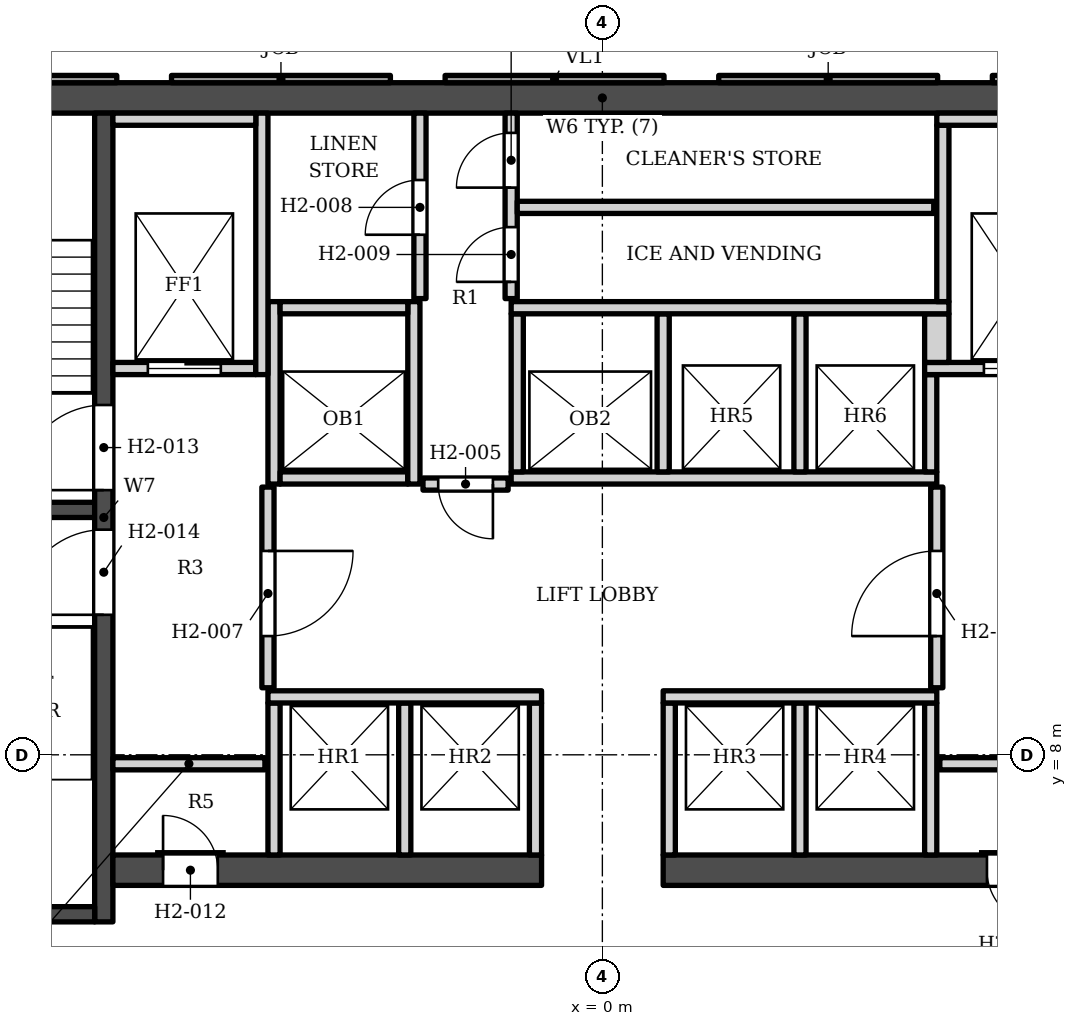
"""IFC4 building model, lengths in metres.
Left out: names, types, materials, properties, quantities, classifications, styles, units other than length and angle.
Written with IfcOpenShell. Run it as: python <this file> out.ifc"""

import sys

from ifc_helpers import new_model, si_unit, direction, frame, frame_2d, origin, place, context, subcontext, project, spatial, polyline, rectangle, outline, extrude, element, fill, save


model = new_model("IFC4")
c1 = context("Model", 3, precision=1e-05, world=origin(), true_north=direction((0.0, 1.0)))
c2 = subcontext(c1, "Body", "Model", "MODEL_VIEW")
j1 = project(units=[si_unit("LENGTHUNIT", "METRE"), si_unit("PLANEANGLEUNIT", "RADIAN")], contexts=[c1])
p1 = place(None, origin())
s1 = spatial("IfcSite", under=j1, at=p1, CompositionType="ELEMENT")
p2 = place(p1, origin())
s2 = spatial("IfcBuilding", under=s1, at=p2, CompositionType="ELEMENT")
p3 = place(p2, frame((0.0, 0.0, 56.2)))
s3 = spatial("IfcBuildingStorey", under=s2, at=p3, CompositionType="ELEMENT", Elevation=56.2)
p4 = place(p3, frame((-16.9, 18.802, 0.0), z_axis=(0.0, 0.0, 1.0), x_axis=(1.0, 0.0, 0.0)))
e1 = element("IfcWall", 1, at=p4, inside=s3, PredefinedType="SHEAR", context=c2, shape_type="SweptSolid", body=[
    extrude(rectangle(XDim=33.8, YDim=0.5, at=frame_2d((16.9, 0.0))), origin(), (0.0, 0.0, 1.0), 3.4),
])
p5 = place(p3, frame((-8.2, 5.253, 0.0), z_axis=(0.0, 0.0, 1.0), x_axis=(0.0, 1.0, 0.0)))
e2 = element("IfcWall", 2, at=p5, inside=s3, PredefinedType="SHEAR", context=c2, shape_type="SweptSolid", body=[
    extrude(rectangle(XDim=13.3, YDim=0.3, at=frame_2d((6.65, 0.0))), origin(), (0.0, 0.0, 1.0), 3.4),
])
p6 = place(p5, frame((7.1, 0.0, 0.0)))
e3 = element("IfcOpeningElement", 3, at=p6, cuts=e2, PredefinedType="OPENING", context=c2, shape_type="SweptSolid", body=[
    extrude(rectangle(XDim=1.4, YDim=2.1, at=frame_2d((0.7, 1.05))), frame((0.0, 0.16, 0.0), z_axis=(0.0, -1.0, 0.0), x_axis=(1.0, 0.0, 0.0)), (0.0, 0.0, 1.0), 0.32),
])
p7 = place(p5, frame((5.05, 0.0, 0.0)))
e4 = element("IfcOpeningElement", 4, at=p7, cuts=e2, PredefinedType="OPENING", context=c2, shape_type="SweptSolid", body=[
    extrude(rectangle(XDim=1.4, YDim=2.1, at=frame_2d((0.7, 1.05))), frame((0.0, 0.16, 0.0), z_axis=(0.0, -1.0, 0.0), x_axis=(1.0, 0.0, 0.0)), (0.0, 0.0, 1.0), 0.32),
])
for number, where, z_axis, x_axis in (
    (5, (-12.1, 12.028, 0.0), (0.0, 0.0, 1.0), (1.0, 0.0, 0.0)),
    (6, (-12.1, 5.378, 0.0), (0.0, 0.0, 1.0), (1.0, 0.0, 0.0)),
):
    element("IfcWall", number, at=place(p3, frame(where, z_axis=z_axis, x_axis=x_axis)), inside=s3, PredefinedType="SHEAR", context=c2, shape_type="SweptSolid", body=[
        extrude(rectangle(XDim=3.75, YDim=0.25, at=frame_2d((1.875, 0.0))), origin(), (0.0, 0.0, 1.0), 3.4),
    ])
p8 = place(p3, frame((-8.05, 6.103, 0.0), z_axis=(0.0, 0.0, 1.0), x_axis=(1.0, 0.0, 0.0)))
e7 = element("IfcWall", 7, at=p8, inside=s3, PredefinedType="SHEAR", context=c2, shape_type="SweptSolid", body=[
    extrude(rectangle(XDim=7.05, YDim=0.5, at=frame_2d((3.525, 0.0))), origin(), (0.0, 0.0, 1.0), 3.4),
])
p9 = place(p8, frame((0.825, 0.0, 0.0)))
e8 = element("IfcOpeningElement", 8, at=p9, cuts=e7, PredefinedType="OPENING", context=c2, shape_type="SweptSolid", body=[
    extrude(rectangle(XDim=0.9, YDim=2.1, at=frame_2d((0.45, 1.05))), frame((0.0, 0.26, 0.0), z_axis=(0.0, -1.0, 0.0), x_axis=(1.0, 0.0, 0.0)), (0.0, 0.0, 1.0), 0.52),
])
p10 = place(p3, frame((1.0, 6.103, 0.0), z_axis=(0.0, 0.0, 1.0), x_axis=(1.0, 0.0, 0.0)))
e9 = element("IfcWall", 9, at=p10, inside=s3, PredefinedType="SHEAR", context=c2, shape_type="SweptSolid", body=[
    extrude(rectangle(XDim=7.05, YDim=0.5, at=frame_2d((3.525, 0.0))), origin(), (0.0, 0.0, 1.0), 3.4),
])
p11 = place(p10, frame((5.325, 0.0, 0.0)))
e10 = element("IfcOpeningElement", 10, at=p11, cuts=e9, PredefinedType="OPENING", context=c2, shape_type="SweptSolid", body=[
    extrude(rectangle(XDim=0.9, YDim=2.1, at=frame_2d((0.45, 1.05))), frame((0.0, 0.26, 0.0), z_axis=(0.0, -1.0, 0.0), x_axis=(1.0, 0.0, 0.0)), (0.0, 0.0, 1.0), 0.52),
])
p12 = place(p3, origin())
e11 = element("IfcWall", 11, at=p12, inside=s3, PredefinedType="ELEMENTEDWALL", context=c2, shape_type="SweptSolid", body=[
    extrude(outline(polyline([(6.414, 19.173), (6.414, 19.052), (10.014, 19.052), (10.014, 19.173), (6.414, 19.173)])), origin(), (0.0, 0.0, 1.0), 2.65),
])
p13 = place(p3, origin())
e12 = element("IfcWall", 12, at=p13, inside=s3, PredefinedType="SOLIDWALL", context=c2, shape_type="SweptSolid", body=[
    extrude(outline(polyline([(1.914, 19.173), (1.914, 19.052), (5.514, 19.052), (5.514, 19.173), (1.914, 19.173)])), origin(), (0.0, 0.0, 1.0), 2.65),
])
p14 = place(p3, origin())
e13 = element("IfcWall", 13, at=p14, inside=s3, PredefinedType="ELEMENTEDWALL", context=c2, shape_type="SweptSolid", body=[
    extrude(outline(polyline([(-2.586, 19.173), (-2.586, 19.052), (1.014, 19.052), (1.014, 19.173), (-2.586, 19.173)])), origin(), (0.0, 0.0, 1.0), 2.65),
])
p15 = place(p3, origin())
e14 = element("IfcWall", 14, at=p15, inside=s3, PredefinedType="SOLIDWALL", context=c2, shape_type="SweptSolid", body=[
    extrude(outline(polyline([(-7.086, 19.173), (-7.086, 19.052), (-3.486, 19.052), (-3.486, 19.173), (-7.086, 19.173)])), origin(), (0.0, 0.0, 1.0), 2.65),
])
p16 = place(p3, origin())
e15 = element("IfcWall", 15, at=p16, inside=s3, PredefinedType="ELEMENTEDWALL", context=c2, shape_type="SweptSolid", body=[
    extrude(outline(polyline([(-11.586, 19.173), (-11.586, 19.052), (-7.986, 19.052), (-7.986, 19.173), (-11.586, 19.173)])), origin(), (0.0, 0.0, 1.0), 2.65),
])
for number, where, z_axis, x_axis in (
    (16, (-5.4, 6.353, 0.0), (0.0, 0.0, 1.0), (0.0, 1.0, 0.0)),
    (17, (-3.25, 6.353, 0.0), (0.0, 0.0, 1.0), (0.0, 1.0, 0.0)),
    (18, (-1.1, 6.353, 0.0), (0.0, 0.0, 1.0), (0.0, 1.0, 0.0)),
    (19, (1.1, 6.353, 0.0), (0.0, 0.0, 1.0), (0.0, 1.0, 0.0)),
    (20, (3.25, 6.353, 0.0), (0.0, 0.0, 1.0), (0.0, 1.0, 0.0)),
    (21, (5.4, 6.353, 0.0), (0.0, 0.0, 1.0), (0.0, 1.0, 0.0)),
    (22, (-8.05, 7.853, 0.0), (0.0, 0.0, 1.0), (1.0, 0.0, 0.0)),
    (23, (5.55, 7.853, 0.0), (0.0, 0.0, 1.0), (1.0, 0.0, 0.0)),
):
    element("IfcWall", number, at=place(p3, frame(where, z_axis=z_axis, x_axis=x_axis)), inside=s3, PredefinedType="SOLIDWALL", context=c2, shape_type="SweptSolid", body=[
        extrude(rectangle(XDim=2.5, YDim=0.2, at=frame_2d((1.25, 0.0))), origin(), (0.0, 0.0, 1.0), 3.23),
    ])
for number, where, z_axis, x_axis in (
    (24, (-5.5, 8.953, 0.0), (0.0, 0.0, 1.0), (1.0, 0.0, 0.0)),
    (25, (1.0, 8.953, 0.0), (0.0, 0.0, 1.0), (1.0, 0.0, 0.0)),
):
    element("IfcWall", number, at=place(p3, frame(where, z_axis=z_axis, x_axis=x_axis)), inside=s3, PredefinedType="SOLIDWALL", context=c2, shape_type="SweptSolid", body=[
        extrude(rectangle(XDim=4.5, YDim=0.2, at=frame_2d((2.25, 0.0))), origin(), (0.0, 0.0, 1.0), 3.23),
    ])
p17 = place(p3, frame((-5.5, 9.103, 0.0), z_axis=(0.0, 0.0, 1.0), x_axis=(0.0, 1.0, 0.0)))
e26 = element("IfcWall", 26, at=p17, inside=s3, PredefinedType="SOLIDWALL", context=c2, shape_type="SweptSolid", body=[
    extrude(rectangle(XDim=3.3, YDim=0.2, at=frame_2d((1.65, 0.0))), origin(), (0.0, 0.0, 1.0), 3.23),
])
p18 = place(p17, frame((0.85, 0.0, 0.0)))
e27 = element("IfcOpeningElement", 27, at=p18, cuts=e26, PredefinedType="OPENING", context=c2, shape_type="SweptSolid", body=[
    extrude(rectangle(XDim=1.4, YDim=2.1, at=frame_2d((0.7, 1.05))), frame((0.0, 0.11, 0.0), z_axis=(0.0, -1.0, 0.0), x_axis=(1.0, 0.0, 0.0)), (0.0, 0.0, 1.0), 0.22),
])
p19 = place(p3, frame((5.5, 9.103, 0.0), z_axis=(0.0, 0.0, 1.0), x_axis=(0.0, 1.0, 0.0)))
e28 = element("IfcWall", 28, at=p19, inside=s3, PredefinedType="SOLIDWALL", context=c2, shape_type="SweptSolid", body=[
    extrude(rectangle(XDim=3.3, YDim=0.2, at=frame_2d((1.65, 0.0))), origin(), (0.0, 0.0, 1.0), 3.23),
])
p20 = place(p19, frame((0.85, 0.0, 0.0)))
e29 = element("IfcOpeningElement", 29, at=p20, cuts=e28, PredefinedType="OPENING", context=c2, shape_type="SweptSolid", body=[
    extrude(rectangle(XDim=1.4, YDim=2.1, at=frame_2d((0.7, 1.05))), frame((0.0, 0.11, 0.0), z_axis=(0.0, -1.0, 0.0), x_axis=(1.0, 0.0, 0.0)), (0.0, 0.0, 1.0), 0.22),
])
p21 = place(p3, frame((-2.95, 12.453, 0.0), z_axis=(0.0, 0.0, 1.0), x_axis=(1.0, 0.0, 0.0)))
e30 = element("IfcWall", 30, at=p21, inside=s3, PredefinedType="SOLIDWALL", context=c2, shape_type="SweptSolid", body=[
    extrude(rectangle(XDim=1.4, YDim=0.2, at=frame_2d((0.7, 0.0))), origin(), (0.0, 0.0, 1.0), 3.23),
])
p22 = place(p21, frame((0.25, 0.0, 0.0)))
e31 = element("IfcOpeningElement", 31, at=p22, cuts=e30, PredefinedType="OPENING", context=c2, shape_type="SweptSolid", body=[
    extrude(rectangle(XDim=0.9, YDim=2.1, at=frame_2d((0.45, 1.05))), frame((0.0, 0.11, 0.0), z_axis=(0.0, -1.0, 0.0), x_axis=(1.0, 0.0, 0.0)), (0.0, 0.0, 1.0), 0.22),
])
p23 = place(p3, frame((-5.4, 12.453, 0.0), z_axis=(0.0, 0.0, 1.0), x_axis=(0.0, 1.0, 0.0)))
e32 = element("IfcWall", 32, at=p23, inside=s3, PredefinedType="SOLIDWALL", context=c2, shape_type="SweptSolid", body=[
    extrude(rectangle(XDim=3.0, YDim=0.2, at=frame_2d((1.5, 0.0))), origin(), (0.0, 0.0, 1.0), 3.23),
])
p24 = place(p3, frame((-5.3, 12.552, 0.0), z_axis=(0.0, 0.0, 1.0), x_axis=(1.0, 0.0, 0.0)))
e33 = element("IfcWall", 33, at=p24, inside=s3, PredefinedType="SOLIDWALL", context=c2, shape_type="SweptSolid", body=[
    extrude(rectangle(XDim=2.1, YDim=0.2, at=frame_2d((1.05, 0.0))), origin(), (0.0, 0.0, 1.0), 3.23),
])
p25 = place(p3, frame((-3.1, 12.453, 0.0), z_axis=(0.0, 0.0, 1.0), x_axis=(0.0, 1.0, 0.0)))
e34 = element("IfcWall", 34, at=p25, inside=s3, PredefinedType="SOLIDWALL", context=c2, shape_type="SweptSolid", body=[
    extrude(rectangle(XDim=3.0, YDim=0.2, at=frame_2d((1.5, 0.0))), origin(), (0.0, 0.0, 1.0), 3.23),
])
p26 = place(p3, frame((-1.5, 12.552, 0.0), z_axis=(0.0, 0.0, 1.0), x_axis=(1.0, 0.0, 0.0)))
e35 = element("IfcWall", 35, at=p26, inside=s3, PredefinedType="SOLIDWALL", context=c2, shape_type="SweptSolid", body=[
    extrude(rectangle(XDim=7.0, YDim=0.2, at=frame_2d((3.5, 0.0))), origin(), (0.0, 0.0, 1.0), 3.23),
])
for number, where, z_axis, x_axis in (
    (36, (-1.4, 12.653, 0.0), (0.0, 0.0, 1.0), (0.0, 1.0, 0.0)),
    (37, (1.0, 12.653, 0.0), (0.0, 0.0, 1.0), (0.0, 1.0, 0.0)),
    (38, (3.25, 12.653, 0.0), (0.0, 0.0, 1.0), (0.0, 1.0, 0.0)),
):
    element("IfcWall", number, at=place(p3, frame(where, z_axis=z_axis, x_axis=x_axis)), inside=s3, PredefinedType="SOLIDWALL", context=c2, shape_type="SweptSolid", body=[
        extrude(rectangle(XDim=2.6, YDim=0.2, at=frame_2d((1.3, 0.0))), origin(), (0.0, 0.0, 1.0), 3.23),
    ])
p27 = place(p3, frame((5.4, 12.653, 0.0), z_axis=(0.0, 0.0, 1.0), x_axis=(0.0, 1.0, 0.0)))
e39 = element("IfcWall", 39, at=p27, inside=s3, PredefinedType="SOLIDWALL", context=c2, shape_type="SweptSolid", body=[
    extrude(rectangle(XDim=1.6, YDim=0.2, at=frame_2d((0.8, 0.0))), origin(), (0.0, 0.0, 1.0), 3.23),
])
p28 = place(p3, frame((-8.05, 14.353, 0.0), z_axis=(0.0, 0.0, 1.0), x_axis=(1.0, 0.0, 0.0)))
e40 = element("IfcWall", 40, at=p28, inside=s3, PredefinedType="SOLIDWALL", context=c2, shape_type="SweptSolid", body=[
    extrude(rectangle(XDim=2.35, YDim=0.2, at=frame_2d((1.175, 0.0))), origin(), (0.0, 0.0, 1.0), 3.23),
])
p29 = place(p28, frame((0.575, 0.0, 0.0)))
e41 = element("IfcOpeningElement", 41, at=p29, cuts=e40, PredefinedType="OPENING", context=c2, shape_type="SweptSolid", body=[
    extrude(rectangle(XDim=1.2, YDim=2.1, at=frame_2d((0.6, 1.05))), frame((0.0, 0.11, 0.0), z_axis=(0.0, -1.0, 0.0), x_axis=(1.0, 0.0, 0.0)), (0.0, 0.0, 1.0), 0.22),
])
p30 = place(p3, frame((-5.6, 14.253, 0.0), z_axis=(0.0, 0.0, 1.0), x_axis=(0.0, 1.0, 0.0)))
e42 = element("IfcWall", 42, at=p30, inside=s3, PredefinedType="SOLIDWALL", context=c2, shape_type="SweptSolid", body=[
    extrude(rectangle(XDim=4.3, YDim=0.2, at=frame_2d((2.15, 0.0))), origin(), (0.0, 0.0, 1.0), 3.23),
])
p31 = place(p3, frame((5.3, 14.353, 0.0), z_axis=(0.0, 0.0, 1.0), x_axis=(1.0, 0.0, 0.0)))
e43 = element("IfcWall", 43, at=p31, inside=s3, PredefinedType="SOLIDWALL", context=c2, shape_type="SweptSolid", body=[
    extrude(rectangle(XDim=2.75, YDim=0.2, at=frame_2d((1.375, 0.0))), origin(), (0.0, 0.0, 1.0), 3.23),
])
p32 = place(p31, frame((0.975, 0.0, 0.0)))
e44 = element("IfcOpeningElement", 44, at=p32, cuts=e43, PredefinedType="OPENING", context=c2, shape_type="SweptSolid", body=[
    extrude(rectangle(XDim=1.2, YDim=2.1, at=frame_2d((0.6, 1.05))), frame((0.0, 0.11, 0.0), z_axis=(0.0, -1.0, 0.0), x_axis=(1.0, 0.0, 0.0)), (0.0, 0.0, 1.0), 0.22),
])
p33 = place(p3, frame((5.5, 14.453, 0.0), z_axis=(0.0, 0.0, 1.0), x_axis=(0.0, 1.0, 0.0)))
e45 = element("IfcWall", 45, at=p33, inside=s3, PredefinedType="SOLIDWALL", context=c2, shape_type="SweptSolid", body=[
    extrude(rectangle(XDim=0.8, YDim=0.4, at=frame_2d((0.4, 0.0))), origin(), (0.0, 0.0, 1.0), 3.23),
])
p34 = place(p3, frame((-5.3, 15.353, 0.0), z_axis=(0.0, 0.0, 1.0), x_axis=(1.0, 0.0, 0.0)))
e46 = element("IfcWall", 46, at=p34, inside=s3, PredefinedType="SOLIDWALL", context=c2, shape_type="SweptSolid", body=[
    extrude(rectangle(XDim=2.1, YDim=0.2, at=frame_2d((1.05, 0.0))), origin(), (0.0, 0.0, 1.0), 3.23),
])
p35 = place(p3, frame((-1.5, 15.353, 0.0), z_axis=(0.0, 0.0, 1.0), x_axis=(1.0, 0.0, 0.0)))
e47 = element("IfcWall", 47, at=p35, inside=s3, PredefinedType="SOLIDWALL", context=c2, shape_type="SweptSolid", body=[
    extrude(rectangle(XDim=7.2, YDim=0.2, at=frame_2d((3.6, 0.0))), origin(), (0.0, 0.0, 1.0), 3.23),
])
p36 = place(p3, frame((5.6, 15.453, 0.0), z_axis=(0.0, 0.0, 1.0), x_axis=(0.0, 1.0, 0.0)))
e48 = element("IfcWall", 48, at=p36, inside=s3, PredefinedType="SOLIDWALL", context=c2, shape_type="SweptSolid", body=[
    extrude(rectangle(XDim=2.9, YDim=0.2, at=frame_2d((1.45, 0.0))), origin(), (0.0, 0.0, 1.0), 3.23),
])
p37 = place(p3, frame((-3.0, 15.503, 0.0), z_axis=(0.0, 0.0, 1.0), x_axis=(0.0, 1.0, 0.0)))
e49 = element("IfcWall", 49, at=p37, inside=s3, PredefinedType="SOLIDWALL", context=c2, shape_type="SweptSolid", body=[
    extrude(rectangle(XDim=3.05, YDim=0.2, at=frame_2d((1.525, 0.0))), origin(), (0.0, 0.0, 1.0), 3.23),
])
p38 = place(p37, frame((1.05, 0.0, 0.0)))
e50 = element("IfcOpeningElement", 50, at=p38, cuts=e49, PredefinedType="OPENING", context=c2, shape_type="SweptSolid", body=[
    extrude(rectangle(XDim=0.9, YDim=2.1, at=frame_2d((0.45, 1.05))), frame((0.0, 0.11, 0.0), z_axis=(0.0, -1.0, 0.0), x_axis=(1.0, 0.0, 0.0)), (0.0, 0.0, 1.0), 0.22),
])
p39 = place(p3, frame((-1.5, 15.503, 0.0), z_axis=(0.0, 0.0, 1.0), x_axis=(0.0, 1.0, 0.0)))
e51 = element("IfcWall", 51, at=p39, inside=s3, PredefinedType="SOLIDWALL", context=c2, shape_type="SweptSolid", body=[
    extrude(rectangle(XDim=3.05, YDim=0.2, at=frame_2d((1.525, 0.0))), origin(), (0.0, 0.0, 1.0), 3.23),
])
p40 = place(p39, frame((0.275, 0.0, 0.0)))
e52 = element("IfcOpeningElement", 52, at=p40, cuts=e51, PredefinedType="OPENING", context=c2, shape_type="SweptSolid", body=[
    extrude(rectangle(XDim=0.9, YDim=2.1, at=frame_2d((0.45, 1.05))), frame((0.0, 0.11, 0.0), z_axis=(0.0, -1.0, 0.0), x_axis=(1.0, 0.0, 0.0)), (0.0, 0.0, 1.0), 0.22),
])
p41 = place(p39, frame((1.825, 0.0, 0.0)))
e53 = element("IfcOpeningElement", 53, at=p41, cuts=e51, PredefinedType="OPENING", context=c2, shape_type="SweptSolid", body=[
    extrude(rectangle(XDim=0.9, YDim=2.1, at=frame_2d((0.45, 1.05))), frame((0.0, 0.11, 0.0), z_axis=(0.0, -1.0, 0.0), x_axis=(1.0, 0.0, 0.0)), (0.0, 0.0, 1.0), 0.22),
])
p42 = place(p3, frame((-1.4, 17.003, 0.0), z_axis=(0.0, 0.0, 1.0), x_axis=(1.0, 0.0, 0.0)))
e54 = element("IfcWall", 54, at=p42, inside=s3, PredefinedType="SOLIDWALL", context=c2, shape_type="SweptSolid", body=[
    extrude(rectangle(XDim=6.85, YDim=0.2, at=frame_2d((3.425, 0.0))), origin(), (0.0, 0.0, 1.0), 3.23),
])
p43 = place(p3, frame((-8.05, 18.453, 0.0), z_axis=(0.0, 0.0, 1.0), x_axis=(1.0, 0.0, 0.0)))
e55 = element("IfcWall", 55, at=p43, inside=s3, PredefinedType="SOLIDWALL", context=c2, shape_type="SweptSolid", body=[
    extrude(rectangle(XDim=2.35, YDim=0.2, at=frame_2d((1.175, 0.0))), origin(), (0.0, 0.0, 1.0), 3.23),
])
p44 = place(p3, frame((5.5, 18.453, 0.0), z_axis=(0.0, 0.0, 1.0), x_axis=(1.0, 0.0, 0.0)))
e56 = element("IfcWall", 56, at=p44, inside=s3, PredefinedType="SOLIDWALL", context=c2, shape_type="SweptSolid", body=[
    extrude(rectangle(XDim=2.55, YDim=0.2, at=frame_2d((1.275, 0.0))), origin(), (0.0, 0.0, 1.0), 3.23),
])
p45 = place(p29, origin())
e57 = element("IfcDoor", 57, at=p45, inside=s3, OperationType="DOUBLE_DOOR_SLIDING", PredefinedType="DOOR", context=c2, shape_type="SweptSolid", body=[
    extrude(rectangle(XDim=1.2, YDim=2.1, at=frame_2d((0.6, 1.05))), frame((0.0, 0.025, 0.0), z_axis=(0.0, -1.0, 0.0), x_axis=(1.0, 0.0, 0.0)), (0.0, 0.0, 1.0), 0.05),
])
fill(e41, e57)
p46 = place(p32, origin())
e58 = element("IfcDoor", 58, at=p46, inside=s3, OperationType="DOUBLE_DOOR_SLIDING", PredefinedType="DOOR", context=c2, shape_type="SweptSolid", body=[
    extrude(rectangle(XDim=1.2, YDim=2.1, at=frame_2d((0.6, 1.05))), frame((0.0, 0.025, 0.0), z_axis=(0.0, -1.0, 0.0), x_axis=(1.0, 0.0, 0.0)), (0.0, 0.0, 1.0), 0.05),
])
fill(e44, e58)
p47 = place(p6, origin())
e59 = element("IfcDoor", 59, at=p47, inside=s3, OperationType="SINGLE_SWING_LEFT", PredefinedType="DOOR", context=c2, shape_type="SweptSolid", body=[
    extrude(rectangle(XDim=1.4, YDim=2.1, at=frame_2d((0.7, 1.05))), frame((0.0, 0.025, 0.0), z_axis=(0.0, -1.0, 0.0), x_axis=(1.0, 0.0, 0.0)), (0.0, 0.0, 1.0), 0.05),
])
fill(e3, e59)
p48 = place(p7, origin())
e60 = element("IfcDoor", 60, at=p48, inside=s3, OperationType="SINGLE_SWING_LEFT", PredefinedType="DOOR", context=c2, shape_type="SweptSolid", body=[
    extrude(rectangle(XDim=1.4, YDim=2.1, at=frame_2d((0.7, 1.05))), frame((0.0, 0.025, 0.0), z_axis=(0.0, -1.0, 0.0), x_axis=(1.0, 0.0, 0.0)), (0.0, 0.0, 1.0), 0.05),
])
fill(e4, e60)
p49 = place(p22, origin())
e61 = element("IfcDoor", 61, at=p49, inside=s3, OperationType="SINGLE_SWING_RIGHT", PredefinedType="DOOR", context=c2, shape_type="SweptSolid", body=[
    extrude(rectangle(XDim=0.9, YDim=2.1, at=frame_2d((0.45, 1.05))), frame((0.0, 0.025, 0.0), z_axis=(0.0, -1.0, 0.0), x_axis=(1.0, 0.0, 0.0)), (0.0, 0.0, 1.0), 0.05),
])
fill(e31, e61)
p50 = place(p18, origin())
e62 = element("IfcDoor", 62, at=p50, inside=s3, OperationType="SINGLE_SWING_RIGHT", PredefinedType="DOOR", context=c2, shape_type="SweptSolid", body=[
    extrude(rectangle(XDim=1.4, YDim=2.1, at=frame_2d((0.7, 1.05))), frame((0.0, 0.025, 0.0), z_axis=(0.0, -1.0, 0.0), x_axis=(1.0, 0.0, 0.0)), (0.0, 0.0, 1.0), 0.05),
])
fill(e27, e62)
p51 = place(p20, origin())
e63 = element("IfcDoor", 63, at=p51, inside=s3, OperationType="SINGLE_SWING_LEFT", PredefinedType="DOOR", context=c2, shape_type="SweptSolid", body=[
    extrude(rectangle(XDim=1.4, YDim=2.1, at=frame_2d((0.7, 1.05))), frame((0.0, 0.025, 0.0), z_axis=(0.0, -1.0, 0.0), x_axis=(1.0, 0.0, 0.0)), (0.0, 0.0, 1.0), 0.05),
])
fill(e29, e63)
p52 = place(p38, origin())
e64 = element("IfcDoor", 64, at=p52, inside=s3, OperationType="SINGLE_SWING_LEFT", PredefinedType="DOOR", context=c2, shape_type="SweptSolid", body=[
    extrude(rectangle(XDim=0.9, YDim=2.1, at=frame_2d((0.45, 1.05))), frame((0.0, 0.025, 0.0), z_axis=(0.0, -1.0, 0.0), x_axis=(1.0, 0.0, 0.0)), (0.0, 0.0, 1.0), 0.05),
])
fill(e50, e64)
p53 = place(p40, origin())
e65 = element("IfcDoor", 65, at=p53, inside=s3, OperationType="SINGLE_SWING_LEFT", PredefinedType="DOOR", context=c2, shape_type="SweptSolid", body=[
    extrude(rectangle(XDim=0.9, YDim=2.1, at=frame_2d((0.45, 1.05))), frame((0.0, 0.025, 0.0), z_axis=(0.0, -1.0, 0.0), x_axis=(1.0, 0.0, 0.0)), (0.0, 0.0, 1.0), 0.05),
])
fill(e52, e65)
p54 = place(p41, origin())
e66 = element("IfcDoor", 66, at=p54, inside=s3, OperationType="SINGLE_SWING_LEFT", PredefinedType="DOOR", context=c2, shape_type="SweptSolid", body=[
    extrude(rectangle(XDim=0.9, YDim=2.1, at=frame_2d((0.45, 1.05))), frame((0.0, 0.025, 0.0), z_axis=(0.0, -1.0, 0.0), x_axis=(1.0, 0.0, 0.0)), (0.0, 0.0, 1.0), 0.05),
])
fill(e53, e66)
p55 = place(p9, origin())
e67 = element("IfcDoor", 67, at=p55, inside=s3, OperationType="SINGLE_SWING_LEFT", PredefinedType="DOOR", context=c2, shape_type="SweptSolid", body=[
    extrude(rectangle(XDim=0.9, YDim=2.1, at=frame_2d((0.45, 1.05))), frame((0.0, 0.025, 0.0), z_axis=(0.0, -1.0, 0.0), x_axis=(1.0, 0.0, 0.0)), (0.0, 0.0, 1.0), 0.05),
])
fill(e8, e67)
p56 = place(p11, origin())
e68 = element("IfcDoor", 68, at=p56, inside=s3, OperationType="SINGLE_SWING_RIGHT", PredefinedType="DOOR", context=c2, shape_type="SweptSolid", body=[
    extrude(rectangle(XDim=0.9, YDim=2.1, at=frame_2d((0.45, 1.05))), frame((0.0, 0.025, 0.0), z_axis=(0.0, -1.0, 0.0), x_axis=(1.0, 0.0, 0.0)), (0.0, 0.0, 1.0), 0.05),
])
fill(e10, e68)
save(model, sys.argv[1])
